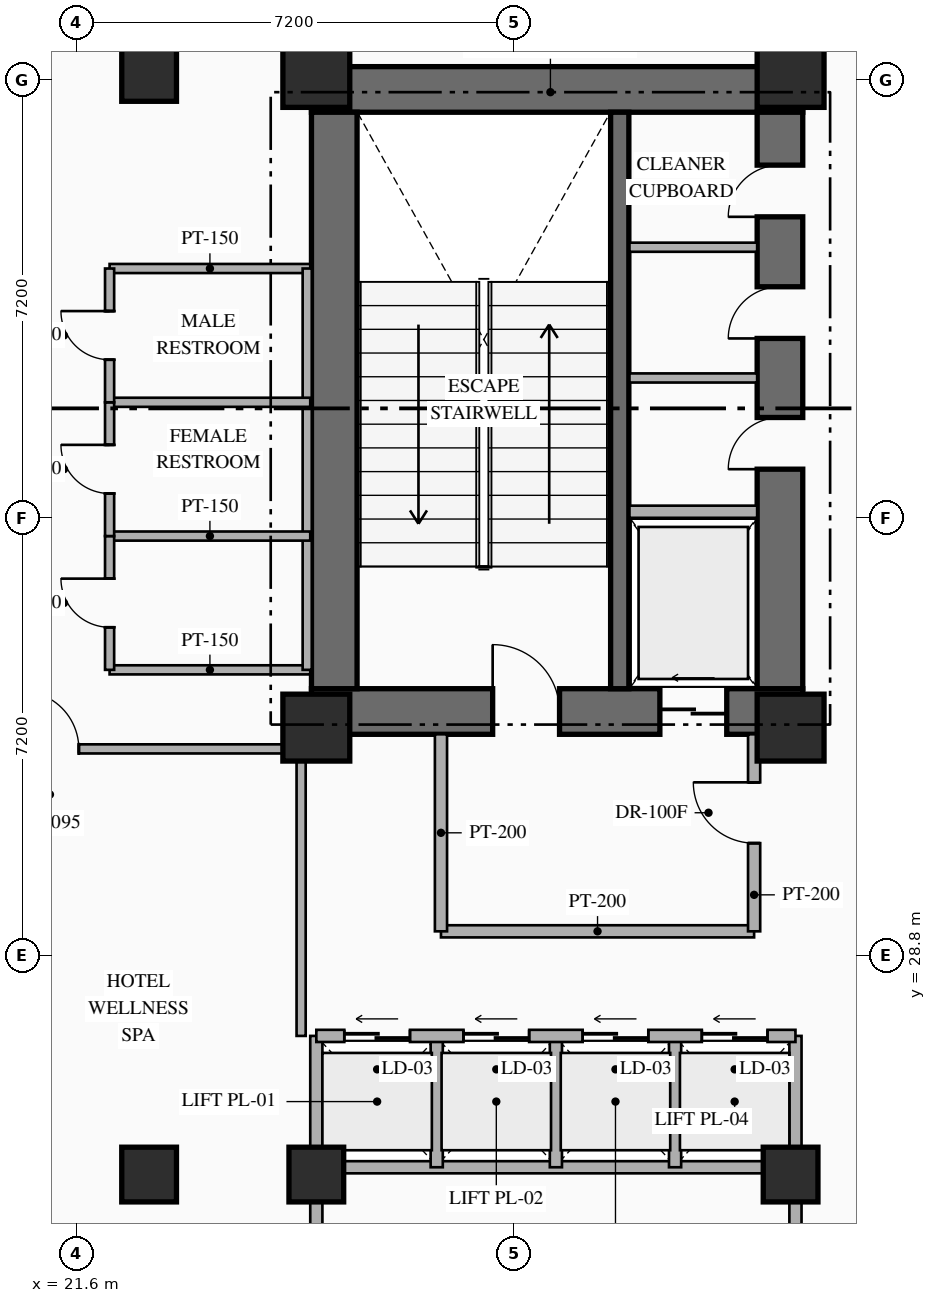
"""IFC4 building model, lengths in metres.
Left out: names, types, materials, properties, quantities, classifications, styles, units other than length and angle.
Written with IfcOpenShell. Run it as: python <this file> out.ifc"""

import sys

from ifc_helpers import new_model, si_unit, direction, frame, frame_2d, origin, origin_2d, place, context, subcontext, project, spatial, rectangle, hollow_rectangle, extrude, element, fill, save


model = new_model("IFC4")
c1 = context("Model", 3, precision=1e-05, world=origin(), true_north=direction((0.0, 1.0)))
c2 = subcontext(c1, "Body", "Model", "MODEL_VIEW")
j1 = project(units=[si_unit("LENGTHUNIT", "METRE"), si_unit("PLANEANGLEUNIT", "RADIAN")], contexts=[c1])
p1 = place(None, origin())
s1 = spatial("IfcSite", under=j1, at=p1, CompositionType="ELEMENT")
p2 = place(p1, origin())
s2 = spatial("IfcBuilding", under=s1, at=p2, CompositionType="ELEMENT")
p3 = place(p2, frame((0.0, 0.0, 70.1)))
s3 = spatial("IfcBuildingStorey", under=s2, at=p3, CompositionType="ELEMENT", Elevation=70.1)
p4 = place(p3, frame((25.47, 32.815, 0.0), z_axis=(0.0, 0.0, 1.0), x_axis=(1.0, 0.0, 0.0)))
e1 = element("IfcWall", 1, at=p4, inside=s3, PredefinedType="SHEAR", context=c2, shape_type="SweptSolid", body=[
    extrude(rectangle(XDim=8.08, YDim=0.75, at=frame_2d((4.04, 0.0))), origin(), (0.0, 0.0, 1.0), 4.5),
])
p5 = place(p4, frame((2.98, 0.0, 0.0)))
e2 = element("IfcOpeningElement", 2, at=p5, cuts=e1, PredefinedType="OPENING", context=c2, shape_type="SweptSolid", body=[
    extrude(rectangle(XDim=1.1, YDim=2.2, at=frame_2d((0.55, 1.1))), frame((0.0, 0.385, 0.0), z_axis=(0.0, -1.0, 0.0), x_axis=(1.0, 0.0, 0.0)), (0.0, 0.0, 1.0), 0.77),
])
p6 = place(p4, frame((5.73, 0.0, 0.0)))
e3 = element("IfcOpeningElement", 3, at=p6, cuts=e1, PredefinedType="OPENING", context=c2, shape_type="SweptSolid", body=[
    extrude(rectangle(XDim=1.1, YDim=2.15, at=frame_2d((0.55, 1.075))), frame((0.0, 0.385, 0.0), z_axis=(0.0, -1.0, 0.0), x_axis=(1.0, 0.0, 0.0)), (0.0, 0.0, 1.0), 0.77),
])
p7 = place(p3, frame((25.47, 43.045, 0.0), z_axis=(0.0, 0.0, 1.0), x_axis=(1.0, 0.0, 0.0)))
e4 = element("IfcWall", 4, at=p7, inside=s3, PredefinedType="SHEAR", context=c2, shape_type="SweptSolid", body=[
    extrude(rectangle(XDim=8.08, YDim=0.75, at=frame_2d((4.04, 0.0))), origin(), (0.0, 0.0, 1.0), 4.5),
])
p8 = place(p3, frame((25.845, 33.19, 0.0), z_axis=(0.0, 0.0, 1.0), x_axis=(0.0, 1.0, 0.0)))
e5 = element("IfcWall", 5, at=p8, inside=s3, PredefinedType="SHEAR", context=c2, shape_type="SweptSolid", body=[
    extrude(rectangle(XDim=9.48, YDim=0.75, at=frame_2d((4.74, 0.0))), origin(), (0.0, 0.0, 1.0), 4.5),
])
p9 = place(p3, frame((33.175, 33.19, 0.0), z_axis=(0.0, 0.0, 1.0), x_axis=(0.0, 1.0, 0.0)))
e6 = element("IfcWall", 6, at=p9, inside=s3, PredefinedType="SHEAR", context=c2, shape_type="SweptSolid", body=[
    extrude(rectangle(XDim=9.48, YDim=0.75, at=frame_2d((4.74, 0.0))), origin(), (0.0, 0.0, 1.0), 4.5),
])
p10 = place(p9, frame((3.61, 0.0, 0.0)))
e7 = element("IfcOpeningElement", 7, at=p10, cuts=e6, PredefinedType="OPENING", context=c2, shape_type="SweptSolid", body=[
    extrude(rectangle(XDim=0.85, YDim=2.08, at=frame_2d((0.425, 1.04))), frame((0.0, 0.385, 0.0), z_axis=(0.0, -1.0, 0.0), x_axis=(1.0, 0.0, 0.0)), (0.0, 0.0, 1.0), 0.77),
])
p11 = place(p9, frame((5.76, 0.0, 0.0)))
e8 = element("IfcOpeningElement", 8, at=p11, cuts=e6, PredefinedType="OPENING", context=c2, shape_type="SweptSolid", body=[
    extrude(rectangle(XDim=0.85, YDim=2.08, at=frame_2d((0.425, 1.04))), frame((0.0, 0.385, 0.0), z_axis=(0.0, -1.0, 0.0), x_axis=(1.0, 0.0, 0.0)), (0.0, 0.0, 1.0), 0.77),
])
p12 = place(p9, frame((7.76, 0.0, 0.0)))
e9 = element("IfcOpeningElement", 9, at=p12, cuts=e6, PredefinedType="OPENING", context=c2, shape_type="SweptSolid", body=[
    extrude(rectangle(XDim=0.85, YDim=2.08, at=frame_2d((0.425, 1.04))), frame((0.0, 0.385, 0.0), z_axis=(0.0, -1.0, 0.0), x_axis=(1.0, 0.0, 0.0)), (0.0, 0.0, 1.0), 0.77),
])
p13 = place(p3, frame((30.54, 33.19, 0.0), z_axis=(0.0, 0.0, 1.0), x_axis=(0.0, 1.0, 0.0)))
e10 = element("IfcWall", 10, at=p13, inside=s3, PredefinedType="SHEAR", context=c2, shape_type="SweptSolid", body=[
    extrude(rectangle(XDim=9.48, YDim=0.3, at=frame_2d((4.74, 0.0))), origin(), (0.0, 0.0, 1.0), 4.5),
])
for number, where, z_axis, x_axis in (
    (11, (25.55, 32.55, 0.0), (0.0, 0.0, 1.0), (1.0, 0.0, 0.0)),
    (12, (33.35, 32.55, 0.0), (0.0, 0.0, 1.0), (1.0, 0.0, 0.0)),
    (13, (25.55, 43.3, 0.0), (0.0, 0.0, 1.0), (1.0, 0.0, 0.0)),
    (14, (33.35, 43.3, 0.0), (0.0, 0.0, 1.0), (1.0, 0.0, 0.0)),
):
    element("IfcColumn", number, at=place(p3, frame(where, z_axis=z_axis, x_axis=x_axis)), inside=s3, PredefinedType="COLUMN", context=c2, shape_type="SweptSolid", body=[
        extrude(rectangle(XDim=1.1, YDim=1.1, at=origin_2d()), origin(), (0.0, 0.0, 1.0), 4.5),
    ])
for number, where, z_axis, x_axis in (
    (15, (25.55, 25.2, 0.0), (0.0, 0.0, 1.0), (1.0, 0.0, 0.0)),
    (16, (33.35, 25.2, 0.0), (0.0, 0.0, 1.0), (1.0, 0.0, 0.0)),
    (17, (22.8, 25.2, 0.0), (0.0, 0.0, 1.0), (1.0, 0.0, 0.0)),
    (18, (22.8, 43.3, 0.0), (0.0, 0.0, 1.0), (1.0, 0.0, 0.0)),
):
    element("IfcColumn", number, at=place(p3, frame(where, z_axis=z_axis, x_axis=x_axis)), inside=s3, PredefinedType="COLUMN", context=c2, shape_type="SweptSolid", body=[
        extrude(hollow_rectangle(XDim=0.9, YDim=0.9, WallThickness=0.036, at=origin_2d()), origin(), (0.0, 0.0, 1.0), 4.5),
    ])
p14 = place(p3, frame((30.7, 36.1, 0.0), z_axis=(0.0, 0.0, 1.0), x_axis=(1.0, 0.0, 0.0)))
e19 = element("IfcWall", 19, at=p14, inside=s3, PredefinedType="STANDARD", context=c2, shape_type="SweptSolid", body=[
    extrude(rectangle(XDim=2.1, YDim=0.2, at=frame_2d((1.05, 0.0))), origin(), (0.0, 0.0, 1.0), 4.28),
])
for number, where, z_axis, x_axis in (
    (20, (30.7, 38.3, 0.0), (0.0, 0.0, 1.0), (1.0, 0.0, 0.0)),
    (21, (30.7, 40.45, 0.0), (0.0, 0.0, 1.0), (1.0, 0.0, 0.0)),
):
    element("IfcWall", number, at=place(p3, frame(where, z_axis=z_axis, x_axis=x_axis)), inside=s3, PredefinedType="PARTITIONING", context=c2, shape_type="SweptSolid", body=[
        extrude(rectangle(XDim=2.1, YDim=0.15, at=frame_2d((1.05, 0.0))), origin(), (0.0, 0.0, 1.0), 4.28),
    ])
p15 = place(p3, frame((27.6, 29.2, 0.0), z_axis=(0.0, 0.0, 1.0), x_axis=(1.0, 0.0, 0.0)))
e22 = element("IfcWall", 22, at=p15, inside=s3, PredefinedType="STANDARD", context=c2, shape_type="SweptSolid", body=[
    extrude(rectangle(XDim=5.15, YDim=0.2, at=frame_2d((2.575, 0.0))), origin(), (0.0, 0.0, 1.0), 4.28),
])
p16 = place(p3, frame((27.6, 29.2, 0.0), z_axis=(0.0, 0.0, 1.0), x_axis=(0.0, 1.0, 0.0)))
e23 = element("IfcWall", 23, at=p16, inside=s3, PredefinedType="STANDARD", context=c2, shape_type="SweptSolid", body=[
    extrude(rectangle(XDim=3.24, YDim=0.2, at=frame_2d((1.62, 0.0))), origin(), (0.0, 0.0, 1.0), 4.28),
])
p17 = place(p3, frame((32.75, 29.2, 0.0), z_axis=(0.0, 0.0, 1.0), x_axis=(0.0, 1.0, 0.0)))
e24 = element("IfcWall", 24, at=p17, inside=s3, PredefinedType="STANDARD", context=c2, shape_type="SweptSolid", body=[
    extrude(rectangle(XDim=3.24, YDim=0.2, at=frame_2d((1.62, 0.0))), origin(), (0.0, 0.0, 1.0), 4.28),
])
p18 = place(p17, frame((1.45, 0.0, 0.0)))
e25 = element("IfcOpeningElement", 25, at=p18, cuts=e24, PredefinedType="OPENING", context=c2, shape_type="SweptSolid", body=[
    extrude(rectangle(XDim=1.0, YDim=2.2, at=frame_2d((0.5, 1.1))), frame((0.0, 0.11, 0.0), z_axis=(0.0, -1.0, 0.0), x_axis=(1.0, 0.0, 0.0)), (0.0, 0.0, 1.0), 0.22),
])
for number, where, z_axis, x_axis in (
    (26, (25.55, 23.4, 0.0), (0.0, 0.0, 1.0), (0.0, 1.0, 0.0)),
    (27, (33.43, 23.4, 0.0), (0.0, 0.0, 1.0), (0.0, 1.0, 0.0)),
):
    element("IfcWall", number, at=place(p3, frame(where, z_axis=z_axis, x_axis=x_axis)), inside=s3, PredefinedType="STANDARD", context=c2, shape_type="SweptSolid", body=[
        extrude(rectangle(XDim=4.08, YDim=0.2, at=frame_2d((2.04, 0.0))), origin(), (0.0, 0.0, 1.0), 3.475),
    ])
p19 = place(p3, frame((25.55, 25.32, 0.0), z_axis=(0.0, 0.0, 1.0), x_axis=(1.0, 0.0, 0.0)))
e28 = element("IfcWall", 28, at=p19, inside=s3, PredefinedType="STANDARD", context=c2, shape_type="SweptSolid", body=[
    extrude(rectangle(XDim=7.88, YDim=0.2, at=frame_2d((3.94, 0.0))), origin(), (0.0, 0.0, 1.0), 3.675),
])
for number, where, z_axis, x_axis in (
    (29, (27.53, 25.32, 0.0), (0.0, 0.0, 1.0), (0.0, 1.0, 0.0)),
    (30, (29.49, 25.32, 0.0), (0.0, 0.0, 1.0), (0.0, 1.0, 0.0)),
    (31, (31.45, 25.32, 0.0), (0.0, 0.0, 1.0), (0.0, 1.0, 0.0)),
):
    element("IfcWall", number, at=place(p3, frame(where, z_axis=z_axis, x_axis=x_axis)), inside=s3, PredefinedType="STANDARD", context=c2, shape_type="SweptSolid", body=[
        extrude(rectangle(XDim=2.16, YDim=0.2, at=frame_2d((1.08, 0.0))), origin(), (0.0, 0.0, 1.0), 4.28),
    ])
p20 = place(p3, frame((25.55, 27.48, 0.0), z_axis=(0.0, 0.0, 1.0), x_axis=(1.0, 0.0, 0.0)))
e32 = element("IfcWall", 32, at=p20, inside=s3, PredefinedType="STANDARD", context=c2, shape_type="SweptSolid", body=[
    extrude(rectangle(XDim=7.88, YDim=0.2, at=frame_2d((3.94, 0.0))), origin(), (0.0, 0.0, 1.0), 4.28),
])
p21 = place(p20, frame((0.46, 0.0, 0.0)))
e33 = element("IfcOpeningElement", 33, at=p21, cuts=e32, PredefinedType="OPENING", context=c2, shape_type="SweptSolid", body=[
    extrude(rectangle(XDim=1.08, YDim=2.15, at=frame_2d((0.54, 1.075))), frame((0.0, 0.11, 0.0), z_axis=(0.0, -1.0, 0.0), x_axis=(1.0, 0.0, 0.0)), (0.0, 0.0, 1.0), 0.22),
])
p22 = place(p20, frame((2.42, 0.0, 0.0)))
e34 = element("IfcOpeningElement", 34, at=p22, cuts=e32, PredefinedType="OPENING", context=c2, shape_type="SweptSolid", body=[
    extrude(rectangle(XDim=1.08, YDim=2.15, at=frame_2d((0.54, 1.075))), frame((0.0, 0.11, 0.0), z_axis=(0.0, -1.0, 0.0), x_axis=(1.0, 0.0, 0.0)), (0.0, 0.0, 1.0), 0.22),
])
p23 = place(p20, frame((4.38, 0.0, 0.0)))
e35 = element("IfcOpeningElement", 35, at=p23, cuts=e32, PredefinedType="OPENING", context=c2, shape_type="SweptSolid", body=[
    extrude(rectangle(XDim=1.08, YDim=2.15, at=frame_2d((0.54, 1.075))), frame((0.0, 0.11, 0.0), z_axis=(0.0, -1.0, 0.0), x_axis=(1.0, 0.0, 0.0)), (0.0, 0.0, 1.0), 0.22),
])
p24 = place(p20, frame((6.34, 0.0, 0.0)))
e36 = element("IfcOpeningElement", 36, at=p24, cuts=e32, PredefinedType="OPENING", context=c2, shape_type="SweptSolid", body=[
    extrude(rectangle(XDim=1.08, YDim=2.15, at=frame_2d((0.54, 1.075))), frame((0.0, 0.11, 0.0), z_axis=(0.0, -1.0, 0.0), x_axis=(1.0, 0.0, 0.0)), (0.0, 0.0, 1.0), 0.22),
])
for number, where, z_axis, x_axis in (
    (37, (22.15, 33.5, 0.0), (0.0, 0.0, 1.0), (1.0, 0.0, 0.0)),
    (38, (22.15, 40.1, 0.0), (0.0, 0.0, 1.0), (1.0, 0.0, 0.0)),
):
    element("IfcWall", number, at=place(p3, frame(where, z_axis=z_axis, x_axis=x_axis)), inside=s3, PredefinedType="PARTITIONING", context=c2, shape_type="SweptSolid", body=[
        extrude(rectangle(XDim=3.3, YDim=0.15, at=frame_2d((1.65, 0.0))), origin(), (0.0, 0.0, 1.0), 4.28),
    ])
p25 = place(p3, frame((25.4, 33.5, 0.0), z_axis=(0.0, 0.0, 1.0), x_axis=(0.0, 1.0, 0.0)))
e39 = element("IfcWall", 39, at=p25, inside=s3, PredefinedType="PARTITIONING", context=c2, shape_type="SweptSolid", body=[
    extrude(rectangle(XDim=6.6, YDim=0.15, at=frame_2d((3.3, 0.0))), origin(), (0.0, 0.0, 1.0), 4.28),
])
for number, where, z_axis, x_axis in (
    (40, (22.15, 35.7, 0.0), (0.0, 0.0, 1.0), (1.0, 0.0, 0.0)),
    (41, (22.15, 37.9, 0.0), (0.0, 0.0, 1.0), (1.0, 0.0, 0.0)),
):
    element("IfcWall", number, at=place(p3, frame(where, z_axis=z_axis, x_axis=x_axis)), inside=s3, PredefinedType="PARTITIONING", context=c2, shape_type="SweptSolid", body=[
        extrude(rectangle(XDim=3.3, YDim=0.15, at=frame_2d((1.65, 0.0))), origin(), (0.0, 0.0, 1.0), 4.28),
    ])
p26 = place(p3, frame((22.15, 33.5, 0.0), z_axis=(0.0, 0.0, 1.0), x_axis=(0.0, 1.0, 0.0)))
e42 = element("IfcWall", 42, at=p26, inside=s3, PredefinedType="PARTITIONING", context=c2, shape_type="SweptSolid", body=[
    extrude(rectangle(XDim=2.2, YDim=0.15, at=frame_2d((1.1, 0.0))), origin(), (0.0, 0.0, 1.0), 4.28),
])
p27 = place(p26, frame((0.7, 0.0, 0.0)))
e43 = element("IfcOpeningElement", 43, at=p27, cuts=e42, PredefinedType="OPENING", context=c2, shape_type="SweptSolid", body=[
    extrude(rectangle(XDim=0.8, YDim=2.06, at=frame_2d((0.4, 1.03))), frame((0.0, 0.085, 0.0), z_axis=(0.0, -1.0, 0.0), x_axis=(1.0, 0.0, 0.0)), (0.0, 0.0, 1.0), 0.17),
])
p28 = place(p3, frame((22.15, 35.7, 0.0), z_axis=(0.0, 0.0, 1.0), x_axis=(0.0, 1.0, 0.0)))
e44 = element("IfcWall", 44, at=p28, inside=s3, PredefinedType="PARTITIONING", context=c2, shape_type="SweptSolid", body=[
    extrude(rectangle(XDim=2.2, YDim=0.15, at=frame_2d((1.1, 0.0))), origin(), (0.0, 0.0, 1.0), 4.28),
])
p29 = place(p28, frame((0.7, 0.0, 0.0)))
e45 = element("IfcOpeningElement", 45, at=p29, cuts=e44, PredefinedType="OPENING", context=c2, shape_type="SweptSolid", body=[
    extrude(rectangle(XDim=0.8, YDim=2.06, at=frame_2d((0.4, 1.03))), frame((0.0, 0.085, 0.0), z_axis=(0.0, -1.0, 0.0), x_axis=(1.0, 0.0, 0.0)), (0.0, 0.0, 1.0), 0.17),
])
p30 = place(p3, frame((22.15, 37.9, 0.0), z_axis=(0.0, 0.0, 1.0), x_axis=(0.0, 1.0, 0.0)))
e46 = element("IfcWall", 46, at=p30, inside=s3, PredefinedType="PARTITIONING", context=c2, shape_type="SweptSolid", body=[
    extrude(rectangle(XDim=2.2, YDim=0.15, at=frame_2d((1.1, 0.0))), origin(), (0.0, 0.0, 1.0), 4.28),
])
p31 = place(p30, frame((0.7, 0.0, 0.0)))
e47 = element("IfcOpeningElement", 47, at=p31, cuts=e46, PredefinedType="OPENING", context=c2, shape_type="SweptSolid", body=[
    extrude(rectangle(XDim=0.8, YDim=2.06, at=frame_2d((0.4, 1.03))), frame((0.0, 0.085, 0.0), z_axis=(0.0, -1.0, 0.0), x_axis=(1.0, 0.0, 0.0)), (0.0, 0.0, 1.0), 0.17),
])
p32 = place(p3, frame((33.384, 17.312, 0.0), z_axis=(0.0, 0.0, 1.0), x_axis=(0.600008743659, 0.799993442181, 0.0)))
e48 = element("IfcWall", 48, at=p32, inside=s3, PredefinedType="PARTITIONING", context=c2, shape_type="SweptSolid", body=[
    extrude(rectangle(XDim=8.935, YDim=0.15, at=frame_2d((4.468, 0.0))), origin(), (0.0, 0.0, 1.0), 4.28),
])
p33 = place(p3, frame((19.95, 32.2, 0.0), z_axis=(0.0, 0.0, 1.0), x_axis=(1.0, 0.0, 0.0)))
e49 = element("IfcWall", 49, at=p33, inside=s3, PredefinedType="PARTITIONING", context=c2, shape_type="SweptSolid", body=[
    extrude(rectangle(XDim=5.35, YDim=0.15, at=frame_2d((2.675, 0.0))), origin(), (0.0, 0.0, 1.0), 4.28),
])
p34 = place(p33, frame((0.744, 0.0, 0.0)))
e50 = element("IfcOpeningElement", 50, at=p34, cuts=e49, PredefinedType="OPENING", context=c2, shape_type="SweptSolid", body=[
    extrude(rectangle(XDim=0.95, YDim=2.15, at=frame_2d((0.475, 1.075))), frame((0.0, 0.085, 0.0), z_axis=(0.0, -1.0, 0.0), x_axis=(1.0, 0.0, 0.0)), (0.0, 0.0, 1.0), 0.17),
])
p35 = place(p3, frame((25.3, 27.48, 0.0), z_axis=(0.0, 0.0, 1.0), x_axis=(0.0, 1.0, 0.0)))
e51 = element("IfcWall", 51, at=p35, inside=s3, PredefinedType="PARTITIONING", context=c2, shape_type="SweptSolid", body=[
    extrude(rectangle(XDim=4.72, YDim=0.15, at=frame_2d((2.36, 0.0))), origin(), (0.0, 0.0, 1.0), 3.475),
])
p36 = place(p5, origin())
e52 = element("IfcDoor", 52, at=p36, inside=s3, OperationType="SINGLE_SWING_LEFT", PredefinedType="DOOR", context=c2, shape_type="SweptSolid", body=[
    extrude(rectangle(XDim=1.1, YDim=2.2, at=frame_2d((0.55, 1.1))), frame((0.0, 0.025, 0.0), z_axis=(0.0, -1.0, 0.0), x_axis=(1.0, 0.0, 0.0)), (0.0, 0.0, 1.0), 0.05),
])
fill(e2, e52)
p37 = place(p6, origin())
e53 = element("IfcDoor", 53, at=p37, inside=s3, OperationType="SLIDING_TO_LEFT", PredefinedType="USERDEFINED", context=c2, shape_type="SweptSolid", body=[
    extrude(rectangle(XDim=1.1, YDim=2.15, at=frame_2d((0.55, 1.075))), frame((0.0, 0.025, 0.0), z_axis=(0.0, -1.0, 0.0), x_axis=(1.0, 0.0, 0.0)), (0.0, 0.0, 1.0), 0.05),
])
fill(e3, e53)
p38 = place(p10, origin())
e54 = element("IfcDoor", 54, at=p38, inside=s3, OperationType="SINGLE_SWING_LEFT", PredefinedType="DOOR", context=c2, shape_type="SweptSolid", body=[
    extrude(rectangle(XDim=0.85, YDim=2.08, at=frame_2d((0.425, 1.04))), frame((0.0, 0.025, 0.0), z_axis=(0.0, -1.0, 0.0), x_axis=(1.0, 0.0, 0.0)), (0.0, 0.0, 1.0), 0.05),
])
fill(e7, e54)
p39 = place(p11, origin())
e55 = element("IfcDoor", 55, at=p39, inside=s3, OperationType="SINGLE_SWING_LEFT", PredefinedType="DOOR", context=c2, shape_type="SweptSolid", body=[
    extrude(rectangle(XDim=0.85, YDim=2.08, at=frame_2d((0.425, 1.04))), frame((0.0, 0.025, 0.0), z_axis=(0.0, -1.0, 0.0), x_axis=(1.0, 0.0, 0.0)), (0.0, 0.0, 1.0), 0.05),
])
fill(e8, e55)
p40 = place(p12, origin())
e56 = element("IfcDoor", 56, at=p40, inside=s3, OperationType="SINGLE_SWING_LEFT", PredefinedType="DOOR", context=c2, shape_type="SweptSolid", body=[
    extrude(rectangle(XDim=0.85, YDim=2.08, at=frame_2d((0.425, 1.04))), frame((0.0, 0.025, 0.0), z_axis=(0.0, -1.0, 0.0), x_axis=(1.0, 0.0, 0.0)), (0.0, 0.0, 1.0), 0.05),
])
fill(e9, e56)
p41 = place(p18, origin())
e57 = element("IfcDoor", 57, at=p41, inside=s3, OperationType="SINGLE_SWING_RIGHT", PredefinedType="DOOR", context=c2, shape_type="SweptSolid", body=[
    extrude(rectangle(XDim=1.0, YDim=2.2, at=frame_2d((0.5, 1.1))), frame((0.0, 0.025, 0.0), z_axis=(0.0, -1.0, 0.0), x_axis=(1.0, 0.0, 0.0)), (0.0, 0.0, 1.0), 0.05),
])
fill(e25, e57)
p42 = place(p21, origin())
e58 = element("IfcDoor", 58, at=p42, inside=s3, OperationType="SLIDING_TO_LEFT", PredefinedType="USERDEFINED", context=c2, shape_type="SweptSolid", body=[
    extrude(rectangle(XDim=1.08, YDim=2.15, at=frame_2d((0.54, 1.075))), frame((0.0, 0.025, 0.0), z_axis=(0.0, -1.0, 0.0), x_axis=(1.0, 0.0, 0.0)), (0.0, 0.0, 1.0), 0.05),
])
fill(e33, e58)
p43 = place(p22, origin())
e59 = element("IfcDoor", 59, at=p43, inside=s3, OperationType="SLIDING_TO_LEFT", PredefinedType="USERDEFINED", context=c2, shape_type="SweptSolid", body=[
    extrude(rectangle(XDim=1.08, YDim=2.15, at=frame_2d((0.54, 1.075))), frame((0.0, 0.025, 0.0), z_axis=(0.0, -1.0, 0.0), x_axis=(1.0, 0.0, 0.0)), (0.0, 0.0, 1.0), 0.05),
])
fill(e34, e59)
p44 = place(p23, origin())
e60 = element("IfcDoor", 60, at=p44, inside=s3, OperationType="SLIDING_TO_LEFT", PredefinedType="USERDEFINED", context=c2, shape_type="SweptSolid", body=[
    extrude(rectangle(XDim=1.08, YDim=2.15, at=frame_2d((0.54, 1.075))), frame((0.0, 0.025, 0.0), z_axis=(0.0, -1.0, 0.0), x_axis=(1.0, 0.0, 0.0)), (0.0, 0.0, 1.0), 0.05),
])
fill(e35, e60)
p45 = place(p24, origin())
e61 = element("IfcDoor", 61, at=p45, inside=s3, OperationType="SLIDING_TO_LEFT", PredefinedType="USERDEFINED", context=c2, shape_type="SweptSolid", body=[
    extrude(rectangle(XDim=1.08, YDim=2.15, at=frame_2d((0.54, 1.075))), frame((0.0, 0.025, 0.0), z_axis=(0.0, -1.0, 0.0), x_axis=(1.0, 0.0, 0.0)), (0.0, 0.0, 1.0), 0.05),
])
fill(e36, e61)
p46 = place(p27, origin())
e62 = element("IfcDoor", 62, at=p46, inside=s3, OperationType="SINGLE_SWING_RIGHT", PredefinedType="DOOR", context=c2, shape_type="SweptSolid", body=[
    extrude(rectangle(XDim=0.8, YDim=2.06, at=frame_2d((0.4, 1.03))), frame((0.0, 0.025, 0.0), z_axis=(0.0, -1.0, 0.0), x_axis=(1.0, 0.0, 0.0)), (0.0, 0.0, 1.0), 0.05),
])
fill(e43, e62)
p47 = place(p29, origin())
e63 = element("IfcDoor", 63, at=p47, inside=s3, OperationType="SINGLE_SWING_RIGHT", PredefinedType="DOOR", context=c2, shape_type="SweptSolid", body=[
    extrude(rectangle(XDim=0.8, YDim=2.06, at=frame_2d((0.4, 1.03))), frame((0.0, 0.025, 0.0), z_axis=(0.0, -1.0, 0.0), x_axis=(1.0, 0.0, 0.0)), (0.0, 0.0, 1.0), 0.05),
])
fill(e45, e63)
p48 = place(p31, origin())
e64 = element("IfcDoor", 64, at=p48, inside=s3, OperationType="SINGLE_SWING_RIGHT", PredefinedType="DOOR", context=c2, shape_type="SweptSolid", body=[
    extrude(rectangle(XDim=0.8, YDim=2.06, at=frame_2d((0.4, 1.03))), frame((0.0, 0.025, 0.0), z_axis=(0.0, -1.0, 0.0), x_axis=(1.0, 0.0, 0.0)), (0.0, 0.0, 1.0), 0.05),
])
fill(e47, e64)
p49 = place(p34, origin())
e65 = element("IfcDoor", 65, at=p49, inside=s3, OperationType="SINGLE_SWING_LEFT", PredefinedType="DOOR", context=c2, shape_type="SweptSolid", body=[
    extrude(rectangle(XDim=0.95, YDim=2.15, at=frame_2d((0.475, 1.075))), frame((0.0, 0.025, 0.0), z_axis=(0.0, -1.0, 0.0), x_axis=(1.0, 0.0, 0.0)), (0.0, 0.0, 1.0), 0.05),
])
fill(e50, e65)
save(model, sys.argv[1])
